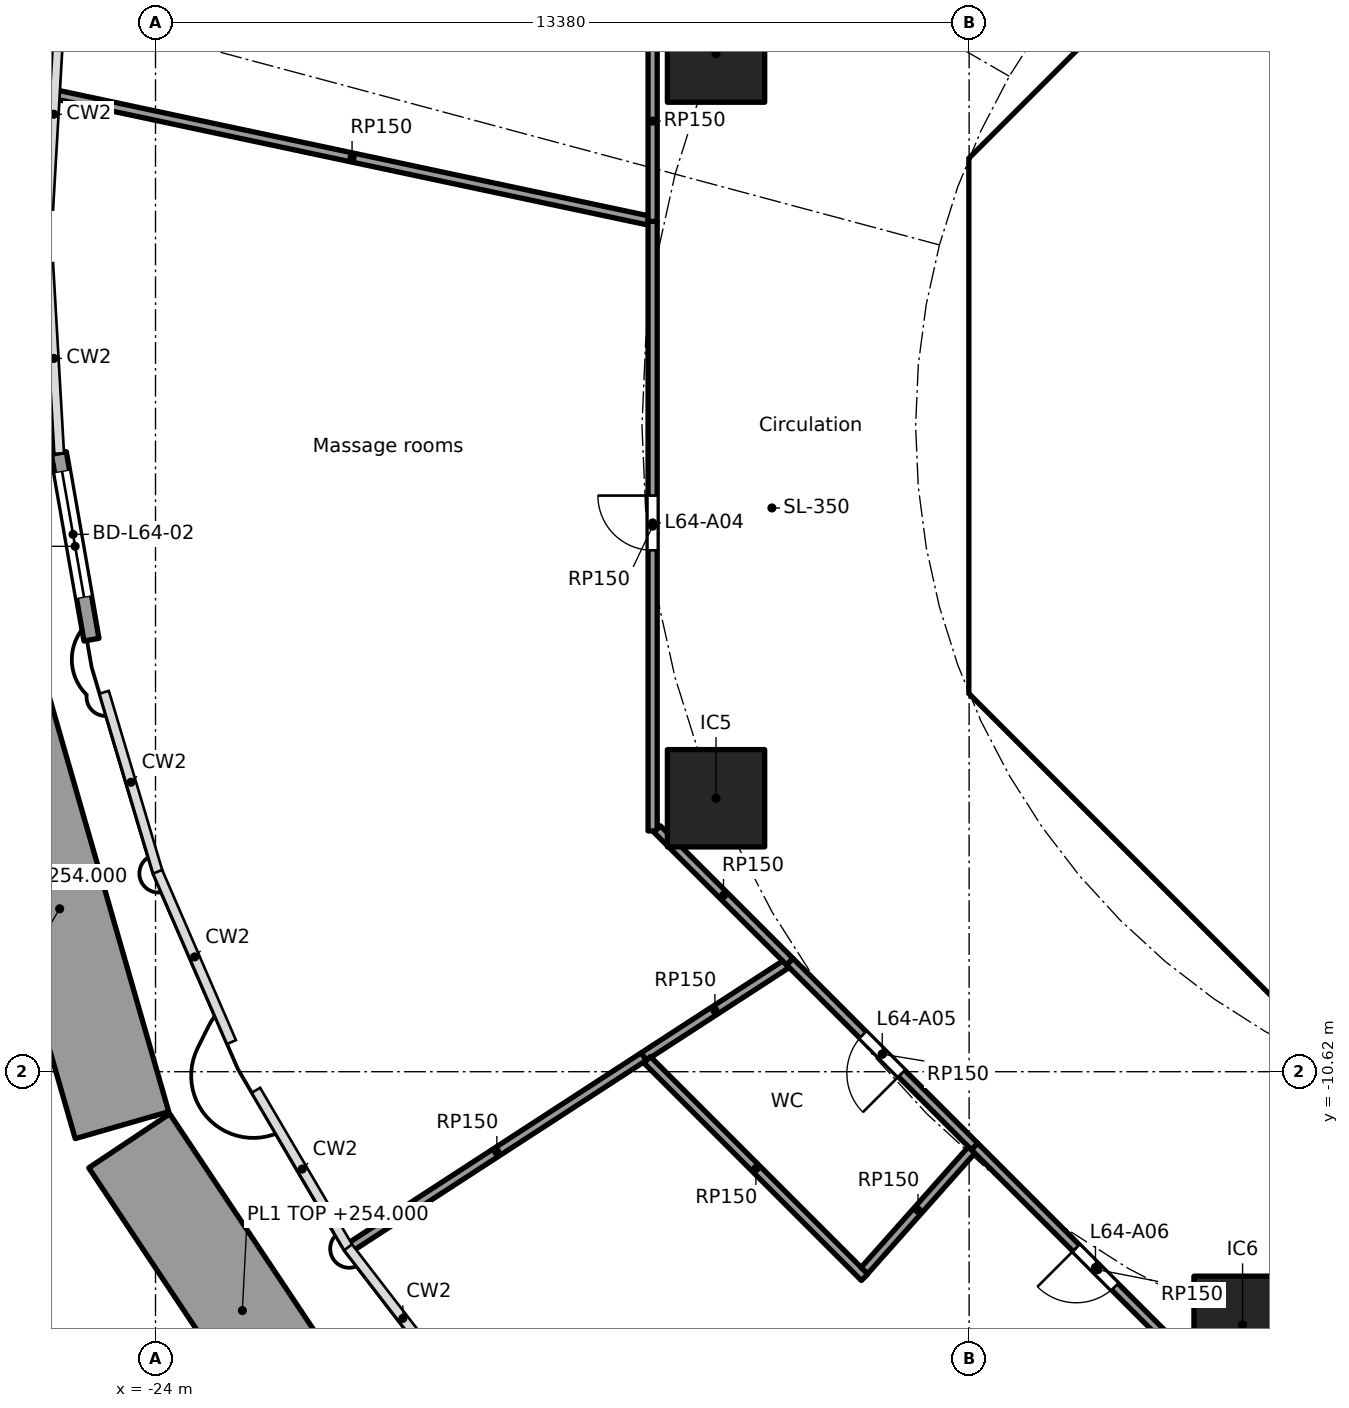
"""IFC4 building model, lengths in metres.
Left out: names, types, materials, properties, quantities, classifications, styles, units other than length and angle.
Written with IfcOpenShell. Run it as: python <this file> out.ifc"""

import sys

from ifc_helpers import new_model, si_unit, direction, frame, frame_2d, origin, origin_2d, place, context, subcontext, project, spatial, polyline, rectangle, outline, extrude, element, fill, save


model = new_model("IFC4")
c1 = context("Model", 3, precision=1e-05, world=origin(), true_north=direction((0.0, 1.0)))
c2 = subcontext(c1, "Body", "Model", "MODEL_VIEW")
j1 = project(units=[si_unit("LENGTHUNIT", "METRE"), si_unit("PLANEANGLEUNIT", "RADIAN")], contexts=[c1])
p1 = place(None, origin())
s1 = spatial("IfcSite", under=j1, at=p1, CompositionType="ELEMENT")
p2 = place(p1, origin())
s2 = spatial("IfcBuilding", under=s1, at=p2, CompositionType="ELEMENT")
p3 = place(p2, frame((0.0, 0.0, 252.9)))
s3 = spatial("IfcBuildingStorey", under=s2, at=p3, CompositionType="ELEMENT", Elevation=252.9)
for number, where, z_axis, x_axis in (
    (1, (-14.782, 6.123, 0.0), (0.0, 0.0, 1.0), (1.0, 0.0, 0.0)),
    (2, (-14.782, -6.123, 0.0), (0.0, 0.0, 1.0), (1.0, 0.0, 0.0)),
    (3, (-6.123, -14.782, 0.0), (0.0, 0.0, 1.0), (1.0, 0.0, 0.0)),
):
    element("IfcColumn", number, at=place(p3, frame(where, z_axis=z_axis, x_axis=x_axis)), inside=s3, PredefinedType="COLUMN", context=c2, shape_type="SweptSolid", body=[
        extrude(rectangle(XDim=1.6, YDim=1.6, at=origin_2d()), origin(), (0.0, 0.0, 1.0), 5.6),
    ])
p4 = place(p3, frame((-25.053, -3.515, 0.0), z_axis=(0.0, 0.0, 1.0), x_axis=(-0.172154239826, 0.985070006502, 0.0)))
e4 = element("IfcWall", 4, at=p4, inside=s3, PredefinedType="SOLIDWALL", context=c2, shape_type="SweptSolid", body=[
    extrude(rectangle(XDim=3.117, YDim=0.25, at=frame_2d((1.559, 0.0))), origin(), (0.0, 0.0, 1.0), 5.34),
])
p5 = place(p4, frame((0.708, 0.0, 0.0)))
e5 = element("IfcOpeningElement", 5, at=p5, cuts=e4, PredefinedType="OPENING", context=c2, shape_type="SweptSolid", body=[
    extrude(rectangle(XDim=2.1, YDim=2.4, at=frame_2d((1.05, 1.2))), frame((0.0, 0.135, 0.0), z_axis=(0.0, -1.0, 0.0), x_axis=(1.0, 0.0, 0.0)), (0.0, 0.0, 1.0), 0.27),
])
p6 = place(p3, frame((-26.601, -4.383, 0.0), z_axis=(0.0, 0.0, 1.0), x_axis=(0.276692978459, -0.960958373537, 0.0)))
e6 = element("IfcWall", 6, at=p6, inside=s3, PredefinedType="SOLIDWALL", context=c2, shape_type="SweptSolid", body=[
    extrude(rectangle(XDim=7.406, YDim=1.6, at=frame_2d((3.703, 0.0))), origin(), (0.0, 0.0, 1.0), 1.1),
])
p7 = place(p3, frame((-24.432, -11.757, 0.0), z_axis=(0.0, 0.0, 1.0), x_axis=(0.554641393293, -0.832089493291, 0.0)))
e7 = element("IfcWall", 7, at=p7, inside=s3, PredefinedType="SOLIDWALL", context=c2, shape_type="SweptSolid", body=[
    extrude(rectangle(XDim=6.707, YDim=1.6, at=frame_2d((3.354, 0.0))), origin(), (0.0, 0.0, 1.0), 1.1),
])
p8 = place(p3, frame((-4.613, 9.988, 0.0), z_axis=(0.0, 0.0, 1.0), x_axis=(-0.707106781187, -0.707106781187, 0.0)))
e8 = element("IfcWall", 8, at=p8, inside=s3, PredefinedType="SHEAR", context=c2, shape_type="SweptSolid", body=[
    extrude(rectangle(XDim=7.602, YDim=0.6, at=frame_2d((3.801, 0.0))), origin(), (0.0, 0.0, 1.0), 5.34),
])
p9 = place(p8, frame((0.351, 0.0, 0.0)))
e9 = element("IfcOpeningElement", 9, at=p9, cuts=e8, PredefinedType="OPENING", context=c2, shape_type="SweptSolid", body=[
    extrude(rectangle(XDim=1.1, YDim=2.1, at=frame_2d((0.55, 1.05))), frame((0.0, 0.31, 0.0), z_axis=(0.0, -1.0, 0.0), x_axis=(1.0, 0.0, 0.0)), (0.0, 0.0, 1.0), 0.62),
])
p10 = place(p3, frame((-10.325, 3.801, 0.0), z_axis=(0.0, 0.0, 1.0), x_axis=(0.0, -1.0, 0.0)))
e10 = element("IfcWall", 10, at=p10, inside=s3, PredefinedType="SHEAR", context=c2, shape_type="SweptSolid", body=[
    extrude(rectangle(XDim=7.602, YDim=0.6, at=frame_2d((3.801, 0.0))), origin(), (0.0, 0.0, 1.0), 5.34),
])
p11 = place(p10, frame((0.651, 0.0, 0.0)))
e11 = element("IfcOpeningElement", 11, at=p11, cuts=e10, PredefinedType="OPENING", context=c2, shape_type="SweptSolid", body=[
    extrude(rectangle(XDim=1.5, YDim=2.1, at=frame_2d((0.75, 1.05))), frame((0.0, 0.31, 0.0), z_axis=(0.0, -1.0, 0.0), x_axis=(1.0, 0.0, 0.0)), (0.0, 0.0, 1.0), 0.62),
])
p12 = place(p10, frame((5.451, 0.0, 0.0)))
e12 = element("IfcOpeningElement", 12, at=p12, cuts=e10, PredefinedType="OPENING", context=c2, shape_type="SweptSolid", body=[
    extrude(rectangle(XDim=1.5, YDim=2.1, at=frame_2d((0.75, 1.05))), frame((0.0, 0.31, 0.0), z_axis=(0.0, -1.0, 0.0), x_axis=(1.0, 0.0, 0.0)), (0.0, 0.0, 1.0), 0.62),
])
p13 = place(p3, frame((-9.988, -4.613, 0.0), z_axis=(0.0, 0.0, 1.0), x_axis=(0.707106781187, -0.707106781187, 0.0)))
e13 = element("IfcWall", 13, at=p13, inside=s3, PredefinedType="SHEAR", context=c2, shape_type="SweptSolid", body=[
    extrude(rectangle(XDim=7.602, YDim=0.6, at=frame_2d((3.801, 0.0))), origin(), (0.0, 0.0, 1.0), 5.34),
])
p14 = place(p13, frame((6.151, 0.0, 0.0)))
e14 = element("IfcOpeningElement", 14, at=p14, cuts=e13, PredefinedType="OPENING", context=c2, shape_type="SweptSolid", body=[
    extrude(rectangle(XDim=1.1, YDim=2.1, at=frame_2d((0.55, 1.05))), frame((0.0, 0.31, 0.0), z_axis=(0.0, -1.0, 0.0), x_axis=(1.0, 0.0, 0.0)), (0.0, 0.0, 1.0), 0.62),
])
p15 = place(p3, frame((-5.8, 4.3, 0.0), z_axis=(0.0, 0.0, 1.0), x_axis=(0.0, 1.0, 0.0)))
e15 = element("IfcWall", 15, at=p15, inside=s3, PredefinedType="PARTITIONING", context=c2, shape_type="SweptSolid", body=[
    extrude(rectangle(XDim=3.927, YDim=0.15, at=frame_2d((1.963, 0.0))), origin(), (0.0, 0.0, 1.0), 5.34),
])
p16 = place(p15, frame((1.551, 0.0, 0.0)))
e16 = element("IfcOpeningElement", 16, at=p16, cuts=e15, PredefinedType="OPENING", context=c2, shape_type="SweptSolid", body=[
    extrude(rectangle(XDim=0.9, YDim=2.1, at=frame_2d((0.45, 1.05))), frame((0.0, 0.085, 0.0), z_axis=(0.0, -1.0, 0.0), x_axis=(1.0, 0.0, 0.0)), (0.0, 0.0, 1.0), 0.17),
])
p17 = place(p3, frame((-6.7, 2.0, 0.0), z_axis=(0.0, 0.0, 1.0), x_axis=(1.0, 0.0, 0.0)))
e17 = element("IfcWall", 17, at=p17, inside=s3, PredefinedType="SOLIDWALL", context=c2, shape_type="SweptSolid", body=[
    extrude(rectangle(XDim=13.4, YDim=0.2, at=frame_2d((6.7, 0.0))), origin(), (0.0, 0.0, 1.0), 5.34),
])
p18 = place(p17, frame((7.25, 0.0, 0.0)))
e18 = element("IfcOpeningElement", 18, at=p18, cuts=e17, PredefinedType="OPENING", context=c2, shape_type="SweptSolid", body=[
    extrude(rectangle(XDim=1.1, YDim=2.1, at=frame_2d((0.55, 1.05))), frame((0.0, 0.11, 0.0), z_axis=(0.0, -1.0, 0.0), x_axis=(1.0, 0.0, 0.0)), (0.0, 0.0, 1.0), 0.22),
])
p19 = place(p17, frame((9.45, 0.0, 0.0)))
e19 = element("IfcOpeningElement", 19, at=p19, cuts=e17, PredefinedType="OPENING", context=c2, shape_type="SweptSolid", body=[
    extrude(rectangle(XDim=1.1, YDim=2.1, at=frame_2d((0.55, 1.05))), frame((0.0, 0.11, 0.0), z_axis=(0.0, -1.0, 0.0), x_axis=(1.0, 0.0, 0.0)), (0.0, 0.0, 1.0), 0.22),
])
p20 = place(p17, frame((11.65, 0.0, 0.0)))
e20 = element("IfcOpeningElement", 20, at=p20, cuts=e17, PredefinedType="OPENING", context=c2, shape_type="SweptSolid", body=[
    extrude(rectangle(XDim=1.1, YDim=2.1, at=frame_2d((0.55, 1.05))), frame((0.0, 0.11, 0.0), z_axis=(0.0, -1.0, 0.0), x_axis=(1.0, 0.0, 0.0)), (0.0, 0.0, 1.0), 0.22),
])
p21 = place(p17, frame((2.95, 0.0, 0.0)))
e21 = element("IfcOpeningElement", 21, at=p21, cuts=e17, PredefinedType="OPENING", context=c2, shape_type="SweptSolid", body=[
    extrude(rectangle(XDim=0.9, YDim=2.1, at=frame_2d((0.45, 1.05))), frame((0.0, 0.11, 0.0), z_axis=(0.0, -1.0, 0.0), x_axis=(1.0, 0.0, 0.0)), (0.0, 0.0, 1.0), 0.22),
])
p22 = place(p3, frame((-6.6, -7.427, 0.0), z_axis=(0.0, 0.0, 1.0), x_axis=(0.0, 1.0, 0.0)))
e22 = element("IfcWall", 22, at=p22, inside=s3, PredefinedType="PARTITIONING", context=c2, shape_type="SweptSolid", body=[
    extrude(rectangle(XDim=3.127, YDim=0.15, at=frame_2d((1.563, 0.0))), origin(), (0.0, 0.0, 1.0), 5.34),
])
p23 = place(p22, frame((1.076, 0.0, 0.0)))
e23 = element("IfcOpeningElement", 23, at=p23, cuts=e22, PredefinedType="OPENING", context=c2, shape_type="SweptSolid", body=[
    extrude(rectangle(XDim=0.9, YDim=2.1, at=frame_2d((0.45, 1.05))), frame((0.0, 0.085, 0.0), z_axis=(0.0, -1.0, 0.0), x_axis=(1.0, 0.0, 0.0)), (0.0, 0.0, 1.0), 0.17),
])
p24 = place(p3, frame((-6.7, -2.0, 0.0), z_axis=(0.0, 0.0, 1.0), x_axis=(1.0, 0.0, 0.0)))
e24 = element("IfcWall", 24, at=p24, inside=s3, PredefinedType="SOLIDWALL", context=c2, shape_type="SweptSolid", body=[
    extrude(rectangle(XDim=13.4, YDim=0.2, at=frame_2d((6.7, 0.0))), origin(), (0.0, 0.0, 1.0), 5.34),
])
p25 = place(p24, frame((5.05, 0.0, 0.0)))
e25 = element("IfcOpeningElement", 25, at=p25, cuts=e24, PredefinedType="OPENING", context=c2, shape_type="SweptSolid", body=[
    extrude(rectangle(XDim=1.1, YDim=2.1, at=frame_2d((0.55, 1.05))), frame((0.0, 0.11, 0.0), z_axis=(0.0, -1.0, 0.0), x_axis=(1.0, 0.0, 0.0)), (0.0, 0.0, 1.0), 0.22),
])
p26 = place(p24, frame((7.25, 0.0, 0.0)))
e26 = element("IfcOpeningElement", 26, at=p26, cuts=e24, PredefinedType="OPENING", context=c2, shape_type="SweptSolid", body=[
    extrude(rectangle(XDim=1.1, YDim=2.1, at=frame_2d((0.55, 1.05))), frame((0.0, 0.11, 0.0), z_axis=(0.0, -1.0, 0.0), x_axis=(1.0, 0.0, 0.0)), (0.0, 0.0, 1.0), 0.22),
])
p27 = place(p24, frame((9.45, 0.0, 0.0)))
e27 = element("IfcOpeningElement", 27, at=p27, cuts=e24, PredefinedType="OPENING", context=c2, shape_type="SweptSolid", body=[
    extrude(rectangle(XDim=1.1, YDim=2.1, at=frame_2d((0.55, 1.05))), frame((0.0, 0.11, 0.0), z_axis=(0.0, -1.0, 0.0), x_axis=(1.0, 0.0, 0.0)), (0.0, 0.0, 1.0), 0.22),
])
p28 = place(p24, frame((11.65, 0.0, 0.0)))
e28 = element("IfcOpeningElement", 28, at=p28, cuts=e24, PredefinedType="OPENING", context=c2, shape_type="SweptSolid", body=[
    extrude(rectangle(XDim=1.1, YDim=2.1, at=frame_2d((0.55, 1.05))), frame((0.0, 0.11, 0.0), z_axis=(0.0, -1.0, 0.0), x_axis=(1.0, 0.0, 0.0)), (0.0, 0.0, 1.0), 0.22),
])
p29 = place(p24, frame((1.85, 0.0, 0.0)))
e29 = element("IfcOpeningElement", 29, at=p29, cuts=e24, PredefinedType="OPENING", context=c2, shape_type="SweptSolid", body=[
    extrude(rectangle(XDim=0.9, YDim=2.1, at=frame_2d((0.45, 1.05))), frame((0.0, 0.11, 0.0), z_axis=(0.0, -1.0, 0.0), x_axis=(1.0, 0.0, 0.0)), (0.0, 0.0, 1.0), 0.22),
])
p30 = place(p3, origin())
e30 = element("IfcWall", 30, at=p30, inside=s3, PredefinedType="SHEAR", context=c2, shape_type="SweptSolid", body=[
    extrude(outline(polyline([(-10.625, -3.801), (-10.025, -3.801), (-10.025, -4.152), (-9.776, -4.401), (-10.2, -4.825), (-10.625, -4.401), (-10.625, -3.801)])), origin(), (0.0, 0.0, 1.0), 5.34),
])
p31 = place(p3, origin())
e31 = element("IfcWall", 31, at=p31, inside=s3, PredefinedType="SHEAR", context=c2, shape_type="SweptSolid", body=[
    extrude(outline(polyline([(-10.2, 4.825), (-9.776, 4.401), (-10.025, 4.152), (-10.025, 3.801), (-10.625, 3.801), (-10.625, 4.401), (-10.2, 4.825)])), origin(), (0.0, 0.0, 1.0), 5.34),
])
p32 = place(p3, origin())
e32 = element("IfcWall", 32, at=p32, inside=s3, PredefinedType="SOLIDWALL", context=c2, shape_type="SweptSolid", body=[
    extrude(outline(polyline([(-6.7, -2.1), (-6.5, -2.1), (-6.5, -4.1), (-2.3, -4.1), (-2.3, -2.1), (-2.1, -2.1), (-2.1, -4.1), (-0.1, -4.1), (-0.1, -2.1), (0.1, -2.1), (0.1, -4.1), (2.1, -4.1), (2.1, -2.1), (2.3, -2.1), (2.3, -4.1), (4.3, -4.1), (4.3, -2.1), (4.5, -2.1), (4.5, -4.1), (6.5, -4.1), (6.5, -2.1), (6.7, -2.1), (6.7, -4.3), (-6.7, -4.3), (-6.7, -2.1)])), origin(), (0.0, 0.0, 1.0), 5.34),
])
p33 = place(p3, origin())
e33 = element("IfcWall", 33, at=p33, inside=s3, PredefinedType="SOLIDWALL", context=c2, shape_type="SweptSolid", body=[
    extrude(outline(polyline([(-6.7, 4.3), (6.7, 4.3), (6.7, 2.1), (6.5, 2.1), (6.5, 4.1), (4.5, 4.1), (4.5, 2.1), (4.3, 2.1), (4.3, 4.1), (2.3, 4.1), (2.3, 2.1), (2.1, 2.1), (2.1, 4.1), (0.1, 4.1), (0.1, 2.1), (-0.1, 2.1), (-0.1, 4.1), (-6.5, 4.1), (-6.5, 2.1), (-6.7, 2.1), (-6.7, 4.3)])), origin(), (0.0, 0.0, 1.0), 5.34),
])
for number, where, z_axis, x_axis in (
    (34, (-10.025, -4.0, 0.0), (0.0, 0.0, 1.0), (1.0, 0.0, 0.0)),
    (35, (-10.025, 4.0, 0.0), (0.0, 0.0, 1.0), (1.0, 0.0, 0.0)),
):
    element("IfcWall", number, at=place(p3, frame(where, z_axis=z_axis, x_axis=x_axis)), inside=s3, PredefinedType="PARTITIONING", context=c2, shape_type="SweptSolid", body=[
        extrude(rectangle(XDim=3.325, YDim=0.2, at=frame_2d((1.662, 0.0))), origin(), (0.0, 0.0, 1.0), 5.34),
    ])
p34 = place(p3, frame((-15.969, -10.37, 0.0), z_axis=(0.0, 0.0, 1.0), x_axis=(-0.838660232874, -0.544654949298, 0.0)))
e36 = element("IfcWall", 36, at=p34, inside=s3, PredefinedType="PARTITIONING", context=c2, shape_type="SweptSolid", body=[
    extrude(rectangle(XDim=5.766, YDim=0.15, at=frame_2d((2.883, 0.0))), origin(), (0.0, 0.0, 1.0), 5.34),
])
p35 = place(p3, frame((-15.825, -6.661, 0.0), z_axis=(0.0, 0.0, 1.0), x_axis=(0.0, 1.0, 0.0)))
e37 = element("IfcWall", 37, at=p35, inside=s3, PredefinedType="PARTITIONING", context=c2, shape_type="SweptSolid", body=[
    extrude(rectangle(XDim=10.025, YDim=0.15, at=frame_2d((5.013, 0.0))), origin(), (0.0, 0.0, 1.0), 5.34),
])
p36 = place(p35, frame((4.615, 0.0, 0.0)))
e38 = element("IfcOpeningElement", 38, at=p36, cuts=e37, PredefinedType="OPENING", context=c2, shape_type="SweptSolid", body=[
    extrude(rectangle(XDim=0.9, YDim=2.1, at=frame_2d((0.45, 1.05))), frame((0.0, 0.085, 0.0), z_axis=(0.0, -1.0, 0.0), x_axis=(1.0, 0.0, 0.0)), (0.0, 0.0, 1.0), 0.17),
])
p37 = place(p3, frame((-15.9, 3.38, 0.0), z_axis=(0.0, 0.0, 1.0), x_axis=(-0.978148189415, 0.20790892127, 0.0)))
e39 = element("IfcWall", 39, at=p37, inside=s3, PredefinedType="PARTITIONING", context=c2, shape_type="SweptSolid", body=[
    extrude(rectangle(XDim=9.953, YDim=0.15, at=frame_2d((4.977, 0.0))), origin(), (0.0, 0.0, 1.0), 5.34),
])
p38 = place(p3, frame((-15.825, 3.364, 0.0), z_axis=(0.0, 0.0, 1.0), x_axis=(0.0, 1.0, 0.0)))
e40 = element("IfcWall", 40, at=p38, inside=s3, PredefinedType="PARTITIONING", context=c2, shape_type="SweptSolid", body=[
    extrude(rectangle(XDim=3.297, YDim=0.15, at=frame_2d((1.648, 0.0))), origin(), (0.0, 0.0, 1.0), 5.34),
])
p39 = place(p3, frame((-13.632, -8.853, 0.0), z_axis=(0.0, 0.0, 1.0), x_axis=(-0.838689782974, -0.544609445323, 0.0)))
e41 = element("IfcWall", 41, at=p39, inside=s3, PredefinedType="PARTITIONING", context=c2, shape_type="SweptSolid", body=[
    extrude(rectangle(XDim=2.786, YDim=0.15, at=frame_2d((1.393, 0.0))), origin(), (0.0, 0.0, 1.0), 5.34),
])
p40 = place(p3, frame((-13.568, -8.811, 0.0), z_axis=(0.0, 0.0, 1.0), x_axis=(-0.707225473048, 0.706988069398, 0.0)))
e42 = element("IfcWall", 42, at=p40, inside=s3, PredefinedType="PARTITIONING", context=c2, shape_type="SweptSolid", body=[
    extrude(rectangle(XDim=3.085, YDim=0.15, at=frame_2d((1.542, 0.0))), origin(), (0.0, 0.0, 1.0), 5.34),
])
p41 = place(p3, frame((-12.339, -14.0, 0.0), z_axis=(0.0, 0.0, 1.0), x_axis=(-0.707130919879, 0.70708264167, 0.0)))
e43 = element("IfcWall", 43, at=p41, inside=s3, PredefinedType="PARTITIONING", context=c2, shape_type="SweptSolid", body=[
    extrude(rectangle(XDim=5.057, YDim=0.15, at=frame_2d((2.528, 0.0))), origin(), (0.0, 0.0, 1.0), 5.34),
])
p42 = place(p3, frame((-10.529, -11.851, 0.0), z_axis=(0.0, 0.0, 1.0), x_axis=(-0.706993180613, 0.707220363512, 0.0)))
e44 = element("IfcWall", 44, at=p42, inside=s3, PredefinedType="PARTITIONING", context=c2, shape_type="SweptSolid", body=[
    extrude(rectangle(XDim=4.299, YDim=0.15, at=frame_2d((2.149, 0.0))), origin(), (0.0, 0.0, 1.0), 5.34),
])
p43 = place(p42, frame((1.699, 0.0, 0.0)))
e45 = element("IfcOpeningElement", 45, at=p43, cuts=e44, PredefinedType="OPENING", context=c2, shape_type="SweptSolid", body=[
    extrude(rectangle(XDim=0.9, YDim=2.1, at=frame_2d((0.45, 1.05))), frame((0.0, 0.085, 0.0), z_axis=(0.0, -1.0, 0.0), x_axis=(1.0, 0.0, 0.0)), (0.0, 0.0, 1.0), 0.17),
])
p44 = place(p3, frame((-10.579, -11.907, 0.0), z_axis=(0.0, 0.0, 1.0), x_axis=(-0.664352419293, -0.747419469227, 0.0)))
e46 = element("IfcWall", 46, at=p44, inside=s3, PredefinedType="PARTITIONING", context=c2, shape_type="SweptSolid", body=[
    extrude(rectangle(XDim=2.654, YDim=0.15, at=frame_2d((1.327, 0.0))), origin(), (0.0, 0.0, 1.0), 5.34),
])
p45 = place(p3, frame((-6.48, -15.9, 0.0), z_axis=(0.0, 0.0, 1.0), x_axis=(-0.707128099168, 0.707085462563, 0.0)))
e47 = element("IfcWall", 47, at=p45, inside=s3, PredefinedType="PARTITIONING", context=c2, shape_type="SweptSolid", body=[
    extrude(rectangle(XDim=5.726, YDim=0.15, at=frame_2d((2.863, 0.0))), origin(), (0.0, 0.0, 1.0), 5.34),
])
p46 = place(p45, frame((2.466, 0.0, 0.0)))
e48 = element("IfcOpeningElement", 48, at=p46, cuts=e47, PredefinedType="OPENING", context=c2, shape_type="SweptSolid", body=[
    extrude(rectangle(XDim=0.9, YDim=2.1, at=frame_2d((0.45, 1.05))), frame((0.0, 0.085, 0.0), z_axis=(0.0, -1.0, 0.0), x_axis=(1.0, 0.0, 0.0)), (0.0, 0.0, 1.0), 0.17),
])
p47 = place(p5, origin())
e49 = element("IfcDoor", 49, at=p47, inside=s3, OperationType="SLIDING_TO_LEFT", PredefinedType="DOOR", context=c2, shape_type="SweptSolid", body=[
    extrude(rectangle(XDim=2.1, YDim=2.4, at=frame_2d((1.05, 1.2))), frame((0.0, 0.025, 0.0), z_axis=(0.0, -1.0, 0.0), x_axis=(1.0, 0.0, 0.0)), (0.0, 0.0, 1.0), 0.05),
])
fill(e5, e49)
p48 = place(p16, origin())
e50 = element("IfcDoor", 50, at=p48, inside=s3, OperationType="SINGLE_SWING_RIGHT", PredefinedType="DOOR", context=c2, shape_type="SweptSolid", body=[
    extrude(rectangle(XDim=0.9, YDim=2.1, at=frame_2d((0.45, 1.05))), frame((0.0, 0.025, 0.0), z_axis=(0.0, -1.0, 0.0), x_axis=(1.0, 0.0, 0.0)), (0.0, 0.0, 1.0), 0.05),
])
fill(e16, e50)
p49 = place(p23, origin())
e51 = element("IfcDoor", 51, at=p49, inside=s3, OperationType="SINGLE_SWING_RIGHT", PredefinedType="DOOR", context=c2, shape_type="SweptSolid", body=[
    extrude(rectangle(XDim=0.9, YDim=2.1, at=frame_2d((0.45, 1.05))), frame((0.0, 0.025, 0.0), z_axis=(0.0, -1.0, 0.0), x_axis=(1.0, 0.0, 0.0)), (0.0, 0.0, 1.0), 0.05),
])
fill(e23, e51)
p50 = place(p11, origin())
e52 = element("IfcDoor", 52, at=p50, inside=s3, OperationType="DOUBLE_DOOR_SINGLE_SWING", PredefinedType="DOOR", context=c2, shape_type="SweptSolid", body=[
    extrude(rectangle(XDim=1.5, YDim=2.1, at=frame_2d((0.75, 1.05))), frame((0.0, 0.025, 0.0), z_axis=(0.0, -1.0, 0.0), x_axis=(1.0, 0.0, 0.0)), (0.0, 0.0, 1.0), 0.05),
])
fill(e11, e52)
p51 = place(p12, origin())
e53 = element("IfcDoor", 53, at=p51, inside=s3, OperationType="DOUBLE_DOOR_SINGLE_SWING", PredefinedType="DOOR", context=c2, shape_type="SweptSolid", body=[
    extrude(rectangle(XDim=1.5, YDim=2.1, at=frame_2d((0.75, 1.05))), frame((0.0, 0.025, 0.0), z_axis=(0.0, -1.0, 0.0), x_axis=(1.0, 0.0, 0.0)), (0.0, 0.0, 1.0), 0.05),
])
fill(e12, e53)
p52 = place(p36, origin())
e54 = element("IfcDoor", 54, at=p52, inside=s3, OperationType="SINGLE_SWING_RIGHT", PredefinedType="DOOR", context=c2, shape_type="SweptSolid", body=[
    extrude(rectangle(XDim=0.9, YDim=2.1, at=frame_2d((0.45, 1.05))), frame((0.0, 0.025, 0.0), z_axis=(0.0, -1.0, 0.0), x_axis=(1.0, 0.0, 0.0)), (0.0, 0.0, 1.0), 0.05),
])
fill(e38, e54)
p53 = place(p43, origin())
e55 = element("IfcDoor", 55, at=p53, inside=s3, OperationType="SINGLE_SWING_LEFT", PredefinedType="DOOR", context=c2, shape_type="SweptSolid", body=[
    extrude(rectangle(XDim=0.9, YDim=2.1, at=frame_2d((0.45, 1.05))), frame((0.0, 0.025, 0.0), z_axis=(0.0, -1.0, 0.0), x_axis=(1.0, 0.0, 0.0)), (0.0, 0.0, 1.0), 0.05),
])
fill(e45, e55)
p54 = place(p46, origin())
e56 = element("IfcDoor", 56, at=p54, inside=s3, OperationType="SINGLE_SWING_RIGHT", PredefinedType="DOOR", context=c2, shape_type="SweptSolid", body=[
    extrude(rectangle(XDim=0.9, YDim=2.1, at=frame_2d((0.45, 1.05))), frame((0.0, 0.025, 0.0), z_axis=(0.0, -1.0, 0.0), x_axis=(1.0, 0.0, 0.0)), (0.0, 0.0, 1.0), 0.05),
])
fill(e48, e56)
save(model, sys.argv[1])
